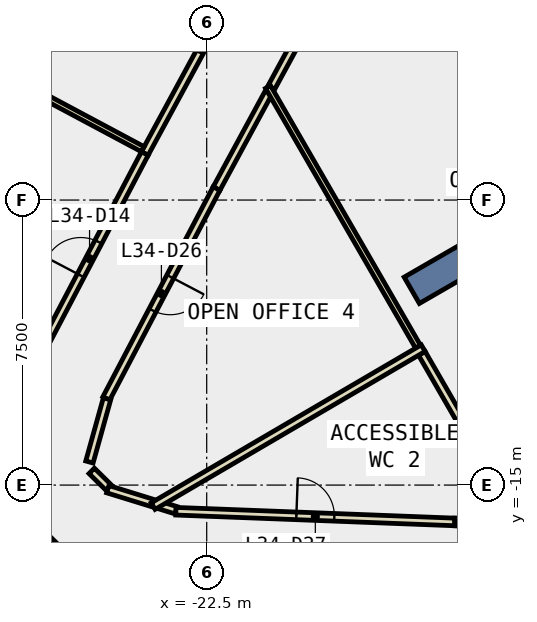
"""IFC4 building model, lengths in metres.
Left out: names, types, materials, properties, quantities, classifications, styles, units other than length and angle.
Written with IfcOpenShell. Run it as: python <this file> out.ifc"""

import sys

from ifc_helpers import new_model, si_unit, direction, frame, frame_2d, origin, place, context, subcontext, project, spatial, rectangle, extrude, element, fill, save


model = new_model("IFC4")
c1 = context("Model", 3, precision=1e-05, world=origin(), true_north=direction((0.0, 1.0)))
c2 = subcontext(c1, "Body", "Model", "MODEL_VIEW")
j1 = project(units=[si_unit("LENGTHUNIT", "METRE"), si_unit("PLANEANGLEUNIT", "RADIAN")], contexts=[c1])
p1 = place(None, origin())
s1 = spatial("IfcSite", under=j1, at=p1, CompositionType="ELEMENT")
p2 = place(p1, origin())
s2 = spatial("IfcBuilding", under=s1, at=p2, CompositionType="ELEMENT")
p3 = place(p2, frame((0.0, 0.0, 155.0)))
s3 = spatial("IfcBuildingStorey", under=s2, at=p3, CompositionType="ELEMENT", Elevation=155.0)
p4 = place(p3, frame((-9.31, -5.375, -0.4), z_axis=(0.0, 0.0, 1.0), x_axis=(-0.866017533419, -0.500013631625, 0.0)))
e1 = element("IfcWall", 1, at=p4, inside=s3, PredefinedType="SHEAR", context=c2, shape_type="SweptSolid", body=[
    extrude(rectangle(XDim=9.0, YDim=0.8, at=frame_2d((4.5, 0.0))), origin(), (0.0, 0.0, 1.0), 4.2),
])
p5 = place(p3, frame((-18.93, -1.095, 0.0), z_axis=(0.0, 0.0, 1.0), x_axis=(-0.476854303058, -0.878982351162, 0.0)))
e2 = element("IfcWall", 2, at=p5, inside=s3, PredefinedType="PARTITIONING", context=c2, shape_type="SweptSolid", body=[
    extrude(rectangle(XDim=3.924, YDim=0.2, at=frame_2d((1.962, 0.0))), origin(), (0.0, 0.0, 1.0), 3.8),
])
p6 = place(p3, frame((-20.873, -4.676, 0.0), z_axis=(0.0, 0.0, 1.0), x_axis=(-0.476781985736, -0.879021579984, 0.0)))
e3 = element("IfcWall", 3, at=p6, inside=s3, PredefinedType="PARTITIONING", context=c2, shape_type="SweptSolid", body=[
    extrude(rectangle(XDim=2.869, YDim=0.2, at=frame_2d((1.435, 0.0))), origin(), (0.0, 0.0, 1.0), 3.8),
])
p7 = place(p3, frame((-22.241, -7.198, 0.0), z_axis=(0.0, 0.0, 1.0), x_axis=(-0.465089990515, -0.885263407536, 0.0)))
e4 = element("IfcWall", 4, at=p7, inside=s3, PredefinedType="PARTITIONING", context=c2, shape_type="SweptSolid", body=[
    extrude(rectangle(XDim=6.24, YDim=0.2, at=frame_2d((3.12, 0.0))), origin(), (0.0, 0.0, 1.0), 3.8),
])
p8 = place(p7, frame((2.62, 0.0, 0.0)))
e5 = element("IfcOpeningElement", 5, at=p8, cuts=e4, PredefinedType="OPENING", context=c2, shape_type="SweptSolid", body=[
    extrude(rectangle(XDim=1.0, YDim=2.1, at=frame_2d((0.5, 1.05))), frame((0.0, 0.11, 0.0), z_axis=(0.0, -1.0, 0.0), x_axis=(1.0, 0.0, 0.0)), (0.0, 0.0, 1.0), 0.22),
])
p9 = place(p3, frame((-25.123, -12.73, 0.0), z_axis=(0.0, 0.0, 1.0), x_axis=(-0.268139825244, -0.963380005044, 0.0)))
e6 = element("IfcWall", 6, at=p9, inside=s3, PredefinedType="PARTITIONING", context=c2, shape_type="SweptSolid", body=[
    extrude(rectangle(XDim=1.726, YDim=0.2, at=frame_2d((0.863, 0.0))), origin(), (0.0, 0.0, 1.0), 3.8),
])
p10 = place(p3, frame((-25.526, -14.626, 0.0), z_axis=(0.0, 0.0, 1.0), x_axis=(0.711758647644, -0.702424108003, 0.0)))
e7 = element("IfcWall", 7, at=p10, inside=s3, PredefinedType="PARTITIONING", context=c2, shape_type="SweptSolid", body=[
    extrude(rectangle(XDim=0.628, YDim=0.2, at=frame_2d((0.314, 0.0))), origin(), (0.0, 0.0, 1.0), 3.8),
])
p11 = place(p3, frame((-25.103, -15.108, 0.0), z_axis=(0.0, 0.0, 1.0), x_axis=(0.955420813731, -0.295247470251, 0.0)))
e8 = element("IfcWall", 8, at=p11, inside=s3, PredefinedType="PARTITIONING", context=c2, shape_type="SweptSolid", body=[
    extrude(rectangle(XDim=1.24, YDim=0.2, at=frame_2d((0.62, 0.0))), origin(), (0.0, 0.0, 1.0), 3.8),
])
p12 = place(p3, frame((-23.727, -15.532, 0.0), z_axis=(0.0, 0.0, 1.0), x_axis=(0.955237350621, -0.295840504289, 0.0)))
e9 = element("IfcWall", 9, at=p12, inside=s3, PredefinedType="PARTITIONING", context=c2, shape_type="SweptSolid", body=[
    extrude(rectangle(XDim=0.44, YDim=0.2, at=frame_2d((0.22, 0.0))), origin(), (0.0, 0.0, 1.0), 3.8),
])
p13 = place(p3, frame((-23.311, -15.688, 0.0), z_axis=(0.0, 0.0, 1.0), x_axis=(0.999262695969, -0.038393546916, 0.0)))
e10 = element("IfcWall", 10, at=p13, inside=s3, PredefinedType="PARTITIONING", context=c2, shape_type="SweptSolid", body=[
    extrude(rectangle(XDim=7.344, YDim=0.2, at=frame_2d((3.672, 0.0))), origin(), (0.0, 0.0, 1.0), 3.8),
])
p14 = place(p13, frame((3.172, 0.0, 0.0)))
e11 = element("IfcOpeningElement", 11, at=p14, cuts=e10, PredefinedType="OPENING", context=c2, shape_type="SweptSolid", body=[
    extrude(rectangle(XDim=1.0, YDim=2.1, at=frame_2d((0.5, 1.05))), frame((0.0, 0.11, 0.0), z_axis=(0.0, -1.0, 0.0), x_axis=(1.0, 0.0, 0.0)), (0.0, 0.0, 1.0), 0.22),
])
p15 = place(p3, frame((-15.972, -15.97, 0.0), z_axis=(0.0, 0.0, 1.0), x_axis=(0.999750111735, -0.022354285623, 0.0)))
e12 = element("IfcWall", 12, at=p15, inside=s3, PredefinedType="PARTITIONING", context=c2, shape_type="SweptSolid", body=[
    extrude(rectangle(XDim=1.616, YDim=0.2, at=frame_2d((0.808, 0.0))), origin(), (0.0, 0.0, 1.0), 3.8),
])
p16 = place(p3, frame((-24.13, -6.275, 0.0), z_axis=(0.0, 0.0, 1.0), x_axis=(0.476981750532, 0.878913198023, 0.0)))
e13 = element("IfcWall", 13, at=p16, inside=s3, PredefinedType="PARTITIONING", context=c2, shape_type="SweptSolid", body=[
    extrude(rectangle(XDim=7.046, YDim=0.2, at=frame_2d((3.523, 0.0))), origin(), (0.0, 0.0, 1.0), 3.8),
])
p17 = place(p16, frame((3.023, 0.0, 0.0)))
e14 = element("IfcOpeningElement", 14, at=p17, cuts=e13, PredefinedType="OPENING", context=c2, shape_type="SweptSolid", body=[
    extrude(rectangle(XDim=1.0, YDim=2.1, at=frame_2d((0.5, 1.05))), frame((0.0, 0.11, 0.0), z_axis=(0.0, -1.0, 0.0), x_axis=(1.0, 0.0, 0.0)), (0.0, 0.0, 1.0), 0.22),
])
p18 = place(p3, frame((-27.106, -11.944, 0.0), z_axis=(0.0, 0.0, 1.0), x_axis=(0.464985599417, 0.885318243534, 0.0)))
e15 = element("IfcWall", 15, at=p18, inside=s3, PredefinedType="PARTITIONING", context=c2, shape_type="SweptSolid", body=[
    extrude(rectangle(XDim=6.402, YDim=0.2, at=frame_2d((3.201, 0.0))), origin(), (0.0, 0.0, 1.0), 3.8),
])
p19 = place(p18, frame((2.776, 0.0, 0.0)))
e16 = element("IfcOpeningElement", 16, at=p19, cuts=e15, PredefinedType="OPENING", context=c2, shape_type="SweptSolid", body=[
    extrude(rectangle(XDim=1.0, YDim=2.1, at=frame_2d((0.5, 1.05))), frame((0.0, 0.11, 0.0), z_axis=(0.0, -1.0, 0.0), x_axis=(1.0, 0.0, 0.0)), (0.0, 0.0, 1.0), 0.22),
])
p20 = place(p3, frame((-26.188, -16.922, 0.0), z_axis=(0.0, 0.0, 1.0), x_axis=(-0.712339678389, 0.701834868465, 0.0)))
e17 = element("IfcWall", 17, at=p20, inside=s3, PredefinedType="PARTITIONING", context=c2, shape_type="SweptSolid", body=[
    extrude(rectangle(XDim=1.72, YDim=0.2, at=frame_2d((0.86, 0.0))), origin(), (0.0, 0.0, 1.0), 3.8),
])
p21 = place(p3, frame((-16.939, -11.36, 0.0), z_axis=(0.0, 0.0, 1.0), x_axis=(-0.500053473428, 0.865994528685, 0.0)))
e18 = element("IfcWall", 18, at=p21, inside=s3, PredefinedType="PARTITIONING", context=c2, shape_type="SweptSolid", body=[
    extrude(rectangle(XDim=7.895, YDim=0.15, at=frame_2d((3.948, 0.0))), origin(), (0.0, 0.0, 1.0), 3.8),
])
p22 = place(p3, frame((-15.18, -14.408, 0.0), z_axis=(0.0, 0.0, 1.0), x_axis=(-0.499968694491, 0.866043477274, 0.0)))
e19 = element("IfcWall", 19, at=p22, inside=s3, PredefinedType="PARTITIONING", context=c2, shape_type="SweptSolid", body=[
    extrude(rectangle(XDim=3.319, YDim=0.2, at=frame_2d((1.659, 0.0))), origin(), (0.0, 0.0, 1.0), 3.8),
])
p23 = place(p3, frame((-16.803, -11.397, 0.0), z_axis=(0.0, 0.0, 1.0), x_axis=(-0.863203941699, -0.504855380318, 0.0)))
e20 = element("IfcWall", 20, at=p23, inside=s3, PredefinedType="PARTITIONING", context=c2, shape_type="SweptSolid", body=[
    extrude(rectangle(XDim=8.232, YDim=0.2, at=frame_2d((4.116, 0.0))), origin(), (0.0, 0.0, 1.0), 3.8),
])
p24 = place(p3, frame((-24.182, -6.162, 0.0), z_axis=(0.0, 0.0, 1.0), x_axis=(-0.88214427755, 0.470979270866, 0.0)))
e21 = element("IfcWall", 21, at=p24, inside=s3, PredefinedType="PARTITIONING", context=c2, shape_type="SweptSolid", body=[
    extrude(rectangle(XDim=4.731, YDim=0.15, at=frame_2d((2.365, 0.0))), origin(), (0.0, 0.0, 1.0), 3.8),
])
p25 = place(p17, origin())
e22 = element("IfcDoor", 22, at=p25, inside=s3, OperationType="SINGLE_SWING_RIGHT", PredefinedType="DOOR", context=c2, shape_type="SweptSolid", body=[
    extrude(rectangle(XDim=1.0, YDim=2.1, at=frame_2d((0.5, 1.05))), frame((0.0, 0.025, 0.0), z_axis=(0.0, -1.0, 0.0), x_axis=(1.0, 0.0, 0.0)), (0.0, 0.0, 1.0), 0.05),
])
fill(e14, e22)
p26 = place(p19, origin())
e23 = element("IfcDoor", 23, at=p26, inside=s3, OperationType="SINGLE_SWING_LEFT", PredefinedType="DOOR", context=c2, shape_type="SweptSolid", body=[
    extrude(rectangle(XDim=1.0, YDim=2.1, at=frame_2d((0.5, 1.05))), frame((0.0, 0.025, 0.0), z_axis=(0.0, -1.0, 0.0), x_axis=(1.0, 0.0, 0.0)), (0.0, 0.0, 1.0), 0.05),
])
fill(e16, e23)
p27 = place(p8, origin())
e24 = element("IfcDoor", 24, at=p27, inside=s3, OperationType="SINGLE_SWING_LEFT", PredefinedType="DOOR", context=c2, shape_type="SweptSolid", body=[
    extrude(rectangle(XDim=1.0, YDim=2.1, at=frame_2d((0.5, 1.05))), frame((0.0, 0.025, 0.0), z_axis=(0.0, -1.0, 0.0), x_axis=(1.0, 0.0, 0.0)), (0.0, 0.0, 1.0), 0.05),
])
fill(e5, e24)
p28 = place(p14, origin())
e25 = element("IfcDoor", 25, at=p28, inside=s3, OperationType="SINGLE_SWING_RIGHT", PredefinedType="DOOR", context=c2, shape_type="SweptSolid", body=[
    extrude(rectangle(XDim=1.0, YDim=2.1, at=frame_2d((0.5, 1.05))), frame((0.0, 0.025, 0.0), z_axis=(0.0, -1.0, 0.0), x_axis=(1.0, 0.0, 0.0)), (0.0, 0.0, 1.0), 0.05),
])
fill(e11, e25)
save(model, sys.argv[1])
